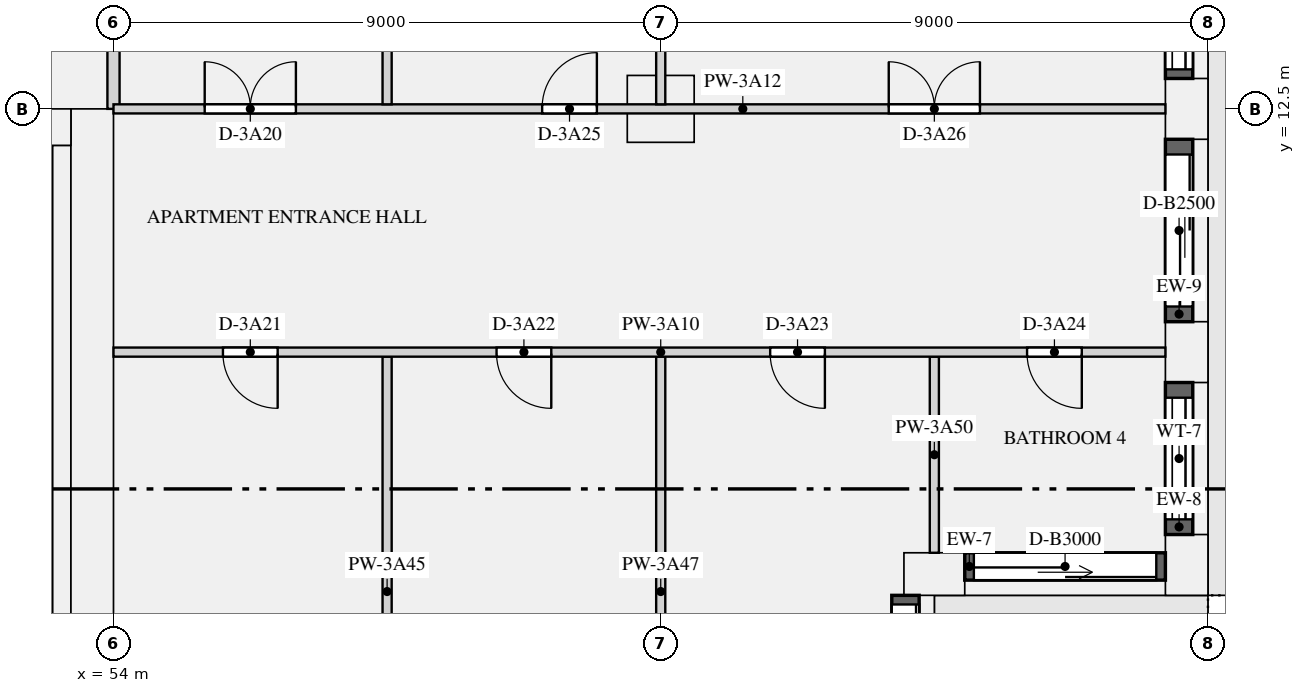
"""IFC4 building model, lengths in metres.
Left out: names, types, materials, properties, quantities, classifications, styles, units other than length and angle.
Written with IfcOpenShell. Run it as: python <this file> out.ifc"""

import sys

from ifc_helpers import new_model, si_unit, direction, frame, frame_2d, origin, origin_2d, place, context, subcontext, project, spatial, rectangle, extrude, element, fill, save


model = new_model("IFC4")
c1 = context("Model", 3, precision=1e-05, world=origin(), true_north=direction((0.0, 1.0)))
c2 = subcontext(c1, "Body", "Model", "MODEL_VIEW")
j1 = project(units=[si_unit("LENGTHUNIT", "METRE"), si_unit("PLANEANGLEUNIT", "RADIAN")], contexts=[c1])
p1 = place(None, origin())
s1 = spatial("IfcSite", under=j1, at=p1, CompositionType="ELEMENT")
p2 = place(p1, origin())
s2 = spatial("IfcBuilding", under=s1, at=p2, CompositionType="ELEMENT")
p3 = place(p2, frame((0.0, 0.0, 141.3)))
s3 = spatial("IfcBuildingStorey", under=s2, at=p3, CompositionType="ELEMENT", Elevation=141.3)
for number, where, z_axis, x_axis in (
    (1, (67.5, 4.85, 0.0), (0.0, 0.0, 1.0), (1.0, 0.0, 0.0)),
    (2, (71.65, 5.0, 0.0), (0.0, 0.0, 1.0), (0.0, 1.0, 0.0)),
    (3, (71.65, 8.5, 0.0), (0.0, 0.0, 1.0), (0.0, 1.0, 0.0)),
    (4, (71.65, 12.5, 0.0), (0.0, 0.0, 1.0), (0.0, 1.0, 0.0)),
):
    element("IfcColumn", number, at=place(p3, frame(where, z_axis=z_axis, x_axis=x_axis)), inside=s3, PredefinedType="USERDEFINED", context=c2, shape_type="SweptSolid", body=[
        extrude(rectangle(XDim=1.0, YDim=0.7, at=origin_2d()), origin(), (0.0, 0.0, 1.0), 3.15),
    ])
p4 = place(p3, frame((63.0, 12.5, 0.0), z_axis=(0.0, 0.0, 1.0), x_axis=(1.0, 0.0, 0.0)))
e5 = element("IfcColumn", 5, at=p4, inside=s3, PredefinedType="COLUMN", context=c2, shape_type="SweptSolid", body=[
    extrude(rectangle(XDim=1.1, YDim=1.1, at=origin_2d()), origin(), (0.0, 0.0, 1.0), 3.15),
])
p5 = place(p3, frame((53.65, 0.0, 0.0), z_axis=(0.0, 0.0, 1.0), x_axis=(0.0, 1.0, 0.0)))
e6 = element("IfcWall", 6, at=p5, inside=s3, PredefinedType="SHEAR", context=c2, shape_type="SweptSolid", body=[
    extrude(rectangle(XDim=12.5, YDim=0.7, at=frame_2d((6.25, 0.0))), origin(), (0.0, 0.0, 1.0), 3.15),
])
p6 = place(p3, frame((18.7, 12.2, 0.0), z_axis=(0.0, 0.0, 1.0), x_axis=(1.0, 0.0, 0.0)))
e7 = element("IfcWall", 7, at=p6, inside=s3, PredefinedType="SHEAR", context=c2, shape_type="SweptSolid", body=[
    extrude(rectangle(XDim=34.6, YDim=0.6, at=frame_2d((17.3, 0.0))), origin(), (0.0, 0.0, 1.0), 3.15),
])
p7 = place(p6, frame((24.475, 0.0, 0.0)))
e8 = element("IfcOpeningElement", 8, at=p7, cuts=e7, PredefinedType="OPENING", context=c2, shape_type="SweptSolid", body=[
    extrude(rectangle(XDim=1.1, YDim=2.1, at=frame_2d((0.55, 1.05))), frame((0.0, 0.31, 0.0), z_axis=(0.0, -1.0, 0.0), x_axis=(1.0, 0.0, 0.0)), (0.0, 0.0, 1.0), 0.62),
])
p8 = place(p6, frame((26.725, 0.0, 0.0)))
e9 = element("IfcOpeningElement", 9, at=p8, cuts=e7, PredefinedType="OPENING", context=c2, shape_type="SweptSolid", body=[
    extrude(rectangle(XDim=1.1, YDim=2.1, at=frame_2d((0.55, 1.05))), frame((0.0, 0.31, 0.0), z_axis=(0.0, -1.0, 0.0), x_axis=(1.0, 0.0, 0.0)), (0.0, 0.0, 1.0), 0.62),
])
p9 = place(p6, frame((28.975, 0.0, 0.0)))
e10 = element("IfcOpeningElement", 10, at=p9, cuts=e7, PredefinedType="OPENING", context=c2, shape_type="SweptSolid", body=[
    extrude(rectangle(XDim=1.1, YDim=2.1, at=frame_2d((0.55, 1.05))), frame((0.0, 0.31, 0.0), z_axis=(0.0, -1.0, 0.0), x_axis=(1.0, 0.0, 0.0)), (0.0, 0.0, 1.0), 0.62),
])
p10 = place(p6, frame((14.35, 0.0, 0.0)))
e11 = element("IfcOpeningElement", 11, at=p10, cuts=e7, PredefinedType="OPENING", context=c2, shape_type="SweptSolid", body=[
    extrude(rectangle(XDim=0.9, YDim=2.1, at=frame_2d((0.45, 1.05))), frame((0.0, 0.31, 0.0), z_axis=(0.0, -1.0, 0.0), x_axis=(1.0, 0.0, 0.0)), (0.0, 0.0, 1.0), 0.62),
])
p11 = place(p6, frame((1.45, 0.0, 0.0)))
e12 = element("IfcOpeningElement", 12, at=p11, cuts=e7, PredefinedType="OPENING", context=c2, shape_type="SweptSolid", body=[
    extrude(rectangle(XDim=1.2, YDim=2.1, at=frame_2d((0.6, 1.05))), frame((0.0, 0.31, 0.0), z_axis=(0.0, -1.0, 0.0), x_axis=(1.0, 0.0, 0.0)), (0.0, 0.0, 1.0), 0.62),
])
p12 = place(p6, frame((31.95, 0.0, 0.0)))
e13 = element("IfcOpeningElement", 13, at=p12, cuts=e7, PredefinedType="OPENING", context=c2, shape_type="SweptSolid", body=[
    extrude(rectangle(XDim=1.2, YDim=2.1, at=frame_2d((0.6, 1.05))), frame((0.0, 0.31, 0.0), z_axis=(0.0, -1.0, 0.0), x_axis=(1.0, 0.0, 0.0)), (0.0, 0.0, 1.0), 0.62),
])
p13 = place(p3, frame((53.15, 1.0, 0.0), z_axis=(0.0, 0.0, 1.0), x_axis=(0.0, 1.0, 0.0)))
e14 = element("IfcWall", 14, at=p13, inside=s3, PredefinedType="SHEAR", context=c2, shape_type="SweptSolid", body=[
    extrude(rectangle(XDim=10.9, YDim=0.3, at=frame_2d((5.45, 0.0))), origin(), (0.0, 0.0, 1.0), 3.15),
])
p14 = place(p3, frame((67.025, 1.0, 0.0), z_axis=(0.0, 0.0, 1.0), x_axis=(0.0, 1.0, 0.0)))
e15 = element("IfcWall", 15, at=p14, inside=s3, PredefinedType="SOLIDWALL", context=c2, shape_type="SweptSolid", body=[
    extrude(rectangle(XDim=3.5, YDim=0.45, at=frame_2d((1.75, 0.0))), origin(), (0.0, 0.0, 1.0), 2.83),
])
p15 = place(p14, frame((0.15, 0.0, 0.0)))
e16 = element("IfcOpeningElement", 16, at=p15, cuts=e15, PredefinedType="OPENING", context=c2, shape_type="SweptSolid", body=[
    extrude(rectangle(XDim=3.2, YDim=2.3, at=frame_2d((1.6, 1.15))), frame((0.0, 0.235, 0.0), z_axis=(0.0, -1.0, 0.0), x_axis=(1.0, 0.0, 0.0)), (0.0, 0.0, 1.0), 0.47),
])
p16 = place(p3, frame((68.0, 4.975, 0.0), z_axis=(0.0, 0.0, 1.0), x_axis=(1.0, 0.0, 0.0)))
e17 = element("IfcWall", 17, at=p16, inside=s3, PredefinedType="SOLIDWALL", context=c2, shape_type="SweptSolid", body=[
    extrude(rectangle(XDim=3.3, YDim=0.45, at=frame_2d((1.65, 0.0))), origin(), (0.0, 0.0, 1.0), 2.83),
])
p17 = place(p16, frame((0.15, 0.0, 0.0)))
e18 = element("IfcOpeningElement", 18, at=p17, cuts=e17, PredefinedType="OPENING", context=c2, shape_type="SweptSolid", body=[
    extrude(rectangle(XDim=3.0, YDim=2.3, at=frame_2d((1.5, 1.15))), frame((0.0, 0.235, 0.0), z_axis=(0.0, -1.0, 0.0), x_axis=(1.0, 0.0, 0.0)), (0.0, 0.0, 1.0), 0.47),
])
p18 = place(p3, frame((71.525, 5.5, 0.9), z_axis=(0.0, 0.0, 1.0), x_axis=(0.0, 1.0, 0.0)))
e19 = element("IfcWall", 19, at=p18, inside=s3, PredefinedType="SOLIDWALL", context=c2, shape_type="SweptSolid", body=[
    extrude(rectangle(XDim=2.5, YDim=0.45, at=frame_2d((1.25, 0.0))), origin(), (0.0, 0.0, 1.0), 1.93),
])
p19 = place(p18, frame((0.25, 0.0, 0.15)))
e20 = element("IfcOpeningElement", 20, at=p19, cuts=e19, PredefinedType="OPENING", context=c2, shape_type="SweptSolid", body=[
    extrude(rectangle(XDim=2.0, YDim=1.5, at=frame_2d((1.0, 0.75))), frame((0.0, 0.235, 0.0), z_axis=(0.0, -1.0, 0.0), x_axis=(1.0, 0.0, 0.0)), (0.0, 0.0, 1.0), 0.47),
])
p20 = place(p3, frame((71.525, 9.0, 0.0), z_axis=(0.0, 0.0, 1.0), x_axis=(0.0, 1.0, 0.0)))
e21 = element("IfcWall", 21, at=p20, inside=s3, PredefinedType="SOLIDWALL", context=c2, shape_type="SweptSolid", body=[
    extrude(rectangle(XDim=3.0, YDim=0.45, at=frame_2d((1.5, 0.0))), origin(), (0.0, 0.0, 1.0), 2.83),
])
p21 = place(p20, frame((0.25, 0.0, 0.0)))
e22 = element("IfcOpeningElement", 22, at=p21, cuts=e21, PredefinedType="OPENING", context=c2, shape_type="SweptSolid", body=[
    extrude(rectangle(XDim=2.5, YDim=2.3, at=frame_2d((1.25, 1.15))), frame((0.0, 0.235, 0.0), z_axis=(0.0, -1.0, 0.0), x_axis=(1.0, 0.0, 0.0)), (0.0, 0.0, 1.0), 0.47),
])
p22 = place(p3, frame((71.525, 13.0, 0.9), z_axis=(0.0, 0.0, 1.0), x_axis=(0.0, 1.0, 0.0)))
e23 = element("IfcWall", 23, at=p22, inside=s3, PredefinedType="SOLIDWALL", context=c2, shape_type="SweptSolid", body=[
    extrude(rectangle(XDim=2.8, YDim=0.45, at=frame_2d((1.4, 0.0))), origin(), (0.0, 0.0, 1.0), 1.93),
])
p23 = place(p22, frame((0.15, 0.0, 0.15)))
e24 = element("IfcOpeningElement", 24, at=p23, cuts=e23, PredefinedType="OPENING", context=c2, shape_type="SweptSolid", body=[
    extrude(rectangle(XDim=2.5, YDim=1.5, at=frame_2d((1.25, 0.75))), frame((0.0, 0.235, 0.0), z_axis=(0.0, -1.0, 0.0), x_axis=(1.0, 0.0, 0.0)), (0.0, 0.0, 1.0), 0.47),
])
p24 = place(p3, frame((54.0, 12.5, 0.0), z_axis=(0.0, 0.0, 1.0), x_axis=(0.0, 1.0, 0.0)))
e25 = element("IfcWall", 25, at=p24, inside=s3, PredefinedType="PARTITIONING", context=c2, shape_type="SweptSolid", body=[
    extrude(rectangle(XDim=3.4, YDim=0.2, at=frame_2d((1.7, 0.0))), origin(), (0.0, 0.0, 1.0), 2.83),
])
p25 = place(p3, frame((54.0, 8.5, 0.0), z_axis=(0.0, 0.0, 1.0), x_axis=(1.0, 0.0, 0.0)))
e26 = element("IfcWall", 26, at=p25, inside=s3, PredefinedType="PARTITIONING", context=c2, shape_type="SweptSolid", body=[
    extrude(rectangle(XDim=17.3, YDim=0.15, at=frame_2d((8.65, 0.0))), origin(), (0.0, 0.0, 1.0), 2.83),
])
p26 = place(p25, frame((1.8, 0.0, 0.0)))
e27 = element("IfcOpeningElement", 27, at=p26, cuts=e26, PredefinedType="OPENING", context=c2, shape_type="SweptSolid", body=[
    extrude(rectangle(XDim=0.9, YDim=2.1, at=frame_2d((0.45, 1.05))), frame((0.0, 0.085, 0.0), z_axis=(0.0, -1.0, 0.0), x_axis=(1.0, 0.0, 0.0)), (0.0, 0.0, 1.0), 0.17),
])
p27 = place(p25, frame((6.3, 0.0, 0.0)))
e28 = element("IfcOpeningElement", 28, at=p27, cuts=e26, PredefinedType="OPENING", context=c2, shape_type="SweptSolid", body=[
    extrude(rectangle(XDim=0.9, YDim=2.1, at=frame_2d((0.45, 1.05))), frame((0.0, 0.085, 0.0), z_axis=(0.0, -1.0, 0.0), x_axis=(1.0, 0.0, 0.0)), (0.0, 0.0, 1.0), 0.17),
])
p28 = place(p25, frame((10.8, 0.0, 0.0)))
e29 = element("IfcOpeningElement", 29, at=p28, cuts=e26, PredefinedType="OPENING", context=c2, shape_type="SweptSolid", body=[
    extrude(rectangle(XDim=0.9, YDim=2.1, at=frame_2d((0.45, 1.05))), frame((0.0, 0.085, 0.0), z_axis=(0.0, -1.0, 0.0), x_axis=(1.0, 0.0, 0.0)), (0.0, 0.0, 1.0), 0.17),
])
p29 = place(p25, frame((15.025, 0.0, 0.0)))
e30 = element("IfcOpeningElement", 30, at=p29, cuts=e26, PredefinedType="OPENING", context=c2, shape_type="SweptSolid", body=[
    extrude(rectangle(XDim=0.9, YDim=2.1, at=frame_2d((0.45, 1.05))), frame((0.0, 0.085, 0.0), z_axis=(0.0, -1.0, 0.0), x_axis=(1.0, 0.0, 0.0)), (0.0, 0.0, 1.0), 0.17),
])
p30 = place(p3, frame((54.0, 12.5, 0.0), z_axis=(0.0, 0.0, 1.0), x_axis=(1.0, 0.0, 0.0)))
e31 = element("IfcWall", 31, at=p30, inside=s3, PredefinedType="PARTITIONING", context=c2, shape_type="SweptSolid", body=[
    extrude(rectangle(XDim=17.3, YDim=0.15, at=frame_2d((8.65, 0.0))), origin(), (0.0, 0.0, 1.0), 2.83),
])
p31 = place(p30, frame((1.5, 0.0, 0.0)))
e32 = element("IfcOpeningElement", 32, at=p31, cuts=e31, PredefinedType="OPENING", context=c2, shape_type="SweptSolid", body=[
    extrude(rectangle(XDim=1.5, YDim=2.1, at=frame_2d((0.75, 1.05))), frame((0.0, 0.085, 0.0), z_axis=(0.0, -1.0, 0.0), x_axis=(1.0, 0.0, 0.0)), (0.0, 0.0, 1.0), 0.17),
])
p32 = place(p30, frame((7.05, 0.0, 0.0)))
e33 = element("IfcOpeningElement", 33, at=p32, cuts=e31, PredefinedType="OPENING", context=c2, shape_type="SweptSolid", body=[
    extrude(rectangle(XDim=0.9, YDim=2.1, at=frame_2d((0.45, 1.05))), frame((0.0, 0.085, 0.0), z_axis=(0.0, -1.0, 0.0), x_axis=(1.0, 0.0, 0.0)), (0.0, 0.0, 1.0), 0.17),
])
p33 = place(p30, frame((12.75, 0.0, 0.0)))
e34 = element("IfcOpeningElement", 34, at=p33, cuts=e31, PredefinedType="OPENING", context=c2, shape_type="SweptSolid", body=[
    extrude(rectangle(XDim=1.5, YDim=2.1, at=frame_2d((0.75, 1.05))), frame((0.0, 0.085, 0.0), z_axis=(0.0, -1.0, 0.0), x_axis=(1.0, 0.0, 0.0)), (0.0, 0.0, 1.0), 0.17),
])
p34 = place(p3, frame((58.5, 0.7, 0.0), z_axis=(0.0, 0.0, 1.0), x_axis=(0.0, 1.0, 0.0)))
e35 = element("IfcWall", 35, at=p34, inside=s3, PredefinedType="PARTITIONING", context=c2, shape_type="SweptSolid", body=[
    extrude(rectangle(XDim=7.725, YDim=0.15, at=frame_2d((3.863, 0.0))), origin(), (0.0, 0.0, 1.0), 2.83),
])
p35 = place(p3, frame((58.5, 12.575, 0.0), z_axis=(0.0, 0.0, 1.0), x_axis=(0.0, 1.0, 0.0)))
e36 = element("IfcWall", 36, at=p35, inside=s3, PredefinedType="PARTITIONING", context=c2, shape_type="SweptSolid", body=[
    extrude(rectangle(XDim=10.325, YDim=0.15, at=frame_2d((5.163, 0.0))), origin(), (0.0, 0.0, 1.0), 2.83),
])
p36 = place(p35, frame((6.75, 0.0, 0.0)))
e37 = element("IfcOpeningElement", 37, at=p36, cuts=e36, PredefinedType="OPENING", context=c2, shape_type="SweptSolid", body=[
    extrude(rectangle(XDim=0.9, YDim=2.1, at=frame_2d((0.45, 1.05))), frame((0.0, 0.085, 0.0), z_axis=(0.0, -1.0, 0.0), x_axis=(1.0, 0.0, 0.0)), (0.0, 0.0, 1.0), 0.17),
])
p37 = place(p3, frame((63.0, 0.7, 0.0), z_axis=(0.0, 0.0, 1.0), x_axis=(0.0, 1.0, 0.0)))
e38 = element("IfcWall", 38, at=p37, inside=s3, PredefinedType="PARTITIONING", context=c2, shape_type="SweptSolid", body=[
    extrude(rectangle(XDim=7.725, YDim=0.15, at=frame_2d((3.863, 0.0))), origin(), (0.0, 0.0, 1.0), 2.83),
])
p38 = place(p3, frame((63.0, 12.575, 0.0), z_axis=(0.0, 0.0, 1.0), x_axis=(0.0, 1.0, 0.0)))
e39 = element("IfcWall", 39, at=p38, inside=s3, PredefinedType="PARTITIONING", context=c2, shape_type="SweptSolid", body=[
    extrude(rectangle(XDim=15.85, YDim=0.15, at=frame_2d((7.925, 0.0))), origin(), (0.0, 0.0, 1.0), 2.83),
])
p39 = place(p38, frame((5.475, 0.0, 0.0)))
e40 = element("IfcOpeningElement", 40, at=p39, cuts=e39, PredefinedType="OPENING", context=c2, shape_type="SweptSolid", body=[
    extrude(rectangle(XDim=0.9, YDim=2.1, at=frame_2d((0.45, 1.05))), frame((0.0, 0.085, 0.0), z_axis=(0.0, -1.0, 0.0), x_axis=(1.0, 0.0, 0.0)), (0.0, 0.0, 1.0), 0.17),
])
p40 = place(p3, frame((67.5, 5.2, 0.0), z_axis=(0.0, 0.0, 1.0), x_axis=(0.0, 1.0, 0.0)))
e41 = element("IfcWall", 41, at=p40, inside=s3, PredefinedType="PARTITIONING", context=c2, shape_type="SweptSolid", body=[
    extrude(rectangle(XDim=3.225, YDim=0.15, at=frame_2d((1.613, 0.0))), origin(), (0.0, 0.0, 1.0), 2.83),
])
p41 = place(p15, origin())
e42 = element("IfcDoor", 42, at=p41, inside=s3, OperationType="SLIDING_TO_LEFT", PredefinedType="DOOR", context=c2, shape_type="SweptSolid", body=[
    extrude(rectangle(XDim=3.2, YDim=2.3, at=frame_2d((1.6, 1.15))), frame((0.0, -0.07, 0.0), z_axis=(0.0, -1.0, 0.0), x_axis=(1.0, 0.0, 0.0)), (0.0, 0.0, 1.0), 0.05),
])
fill(e16, e42)
p42 = place(p17, origin())
e43 = element("IfcDoor", 43, at=p42, inside=s3, OperationType="SLIDING_TO_LEFT", PredefinedType="DOOR", context=c2, shape_type="SweptSolid", body=[
    extrude(rectangle(XDim=3.0, YDim=2.3, at=frame_2d((1.5, 1.15))), frame((0.0, -0.07, 0.0), z_axis=(0.0, -1.0, 0.0), x_axis=(1.0, 0.0, 0.0)), (0.0, 0.0, 1.0), 0.05),
])
fill(e18, e43)
p43 = place(p19, origin())
e44 = element("IfcWindow", 44, at=p43, inside=s3, PartitioningType="SINGLE_PANEL", PredefinedType="WINDOW", context=c2, shape_type="SweptSolid", body=[
    extrude(rectangle(XDim=2.0, YDim=1.5, at=frame_2d((1.0, 0.75))), frame((0.0, -0.065, 0.0), z_axis=(0.0, -1.0, 0.0), x_axis=(1.0, 0.0, 0.0)), (0.0, 0.0, 1.0), 0.06),
])
fill(e20, e44)
p44 = place(p21, origin())
e45 = element("IfcDoor", 45, at=p44, inside=s3, OperationType="SLIDING_TO_LEFT", PredefinedType="DOOR", context=c2, shape_type="SweptSolid", body=[
    extrude(rectangle(XDim=2.5, YDim=2.3, at=frame_2d((1.25, 1.15))), frame((0.0, -0.07, 0.0), z_axis=(0.0, -1.0, 0.0), x_axis=(1.0, 0.0, 0.0)), (0.0, 0.0, 1.0), 0.05),
])
fill(e22, e45)
p45 = place(p23, origin())
e46 = element("IfcWindow", 46, at=p45, inside=s3, PartitioningType="SINGLE_PANEL", PredefinedType="WINDOW", context=c2, shape_type="SweptSolid", body=[
    extrude(rectangle(XDim=2.5, YDim=1.5, at=frame_2d((1.25, 0.75))), frame((0.0, -0.065, 0.0), z_axis=(0.0, -1.0, 0.0), x_axis=(1.0, 0.0, 0.0)), (0.0, 0.0, 1.0), 0.06),
])
fill(e24, e46)
p46 = place(p31, origin())
e47 = element("IfcDoor", 47, at=p46, inside=s3, OperationType="DOUBLE_DOOR_SINGLE_SWING", PredefinedType="DOOR", context=c2, shape_type="SweptSolid", body=[
    extrude(rectangle(XDim=1.5, YDim=2.1, at=frame_2d((0.75, 1.05))), frame((0.0, 0.025, 0.0), z_axis=(0.0, -1.0, 0.0), x_axis=(1.0, 0.0, 0.0)), (0.0, 0.0, 1.0), 0.05),
])
fill(e32, e47)
p47 = place(p26, frame((0.9, 0.0, 0.0), z_axis=(0.0, 0.0, 1.0), x_axis=(-1.0, 0.0, 0.0)))
e48 = element("IfcDoor", 48, at=p47, inside=s3, OperationType="SINGLE_SWING_LEFT", PredefinedType="DOOR", context=c2, shape_type="SweptSolid", body=[
    extrude(rectangle(XDim=0.9, YDim=2.1, at=frame_2d((0.45, 1.05))), frame((0.0, 0.025, 0.0), z_axis=(0.0, -1.0, 0.0), x_axis=(1.0, 0.0, 0.0)), (0.0, 0.0, 1.0), 0.05),
])
fill(e27, e48)
p48 = place(p27, frame((0.9, 0.0, 0.0), z_axis=(0.0, 0.0, 1.0), x_axis=(-1.0, 0.0, 0.0)))
e49 = element("IfcDoor", 49, at=p48, inside=s3, OperationType="SINGLE_SWING_LEFT", PredefinedType="DOOR", context=c2, shape_type="SweptSolid", body=[
    extrude(rectangle(XDim=0.9, YDim=2.1, at=frame_2d((0.45, 1.05))), frame((0.0, 0.025, 0.0), z_axis=(0.0, -1.0, 0.0), x_axis=(1.0, 0.0, 0.0)), (0.0, 0.0, 1.0), 0.05),
])
fill(e28, e49)
p49 = place(p28, frame((0.9, 0.0, 0.0), z_axis=(0.0, 0.0, 1.0), x_axis=(-1.0, 0.0, 0.0)))
e50 = element("IfcDoor", 50, at=p49, inside=s3, OperationType="SINGLE_SWING_LEFT", PredefinedType="DOOR", context=c2, shape_type="SweptSolid", body=[
    extrude(rectangle(XDim=0.9, YDim=2.1, at=frame_2d((0.45, 1.05))), frame((0.0, 0.025, 0.0), z_axis=(0.0, -1.0, 0.0), x_axis=(1.0, 0.0, 0.0)), (0.0, 0.0, 1.0), 0.05),
])
fill(e29, e50)
p50 = place(p29, frame((0.9, 0.0, 0.0), z_axis=(0.0, 0.0, 1.0), x_axis=(-1.0, 0.0, 0.0)))
e51 = element("IfcDoor", 51, at=p50, inside=s3, OperationType="SINGLE_SWING_LEFT", PredefinedType="DOOR", context=c2, shape_type="SweptSolid", body=[
    extrude(rectangle(XDim=0.9, YDim=2.1, at=frame_2d((0.45, 1.05))), frame((0.0, 0.025, 0.0), z_axis=(0.0, -1.0, 0.0), x_axis=(1.0, 0.0, 0.0)), (0.0, 0.0, 1.0), 0.05),
])
fill(e30, e51)
p51 = place(p32, origin())
e52 = element("IfcDoor", 52, at=p51, inside=s3, OperationType="SINGLE_SWING_RIGHT", PredefinedType="DOOR", context=c2, shape_type="SweptSolid", body=[
    extrude(rectangle(XDim=0.9, YDim=2.1, at=frame_2d((0.45, 1.05))), frame((0.0, 0.025, 0.0), z_axis=(0.0, -1.0, 0.0), x_axis=(1.0, 0.0, 0.0)), (0.0, 0.0, 1.0), 0.05),
])
fill(e33, e52)
p52 = place(p33, origin())
e53 = element("IfcDoor", 53, at=p52, inside=s3, OperationType="DOUBLE_DOOR_SINGLE_SWING", PredefinedType="DOOR", context=c2, shape_type="SweptSolid", body=[
    extrude(rectangle(XDim=1.5, YDim=2.1, at=frame_2d((0.75, 1.05))), frame((0.0, 0.025, 0.0), z_axis=(0.0, -1.0, 0.0), x_axis=(1.0, 0.0, 0.0)), (0.0, 0.0, 1.0), 0.05),
])
fill(e34, e53)
save(model, sys.argv[1])
